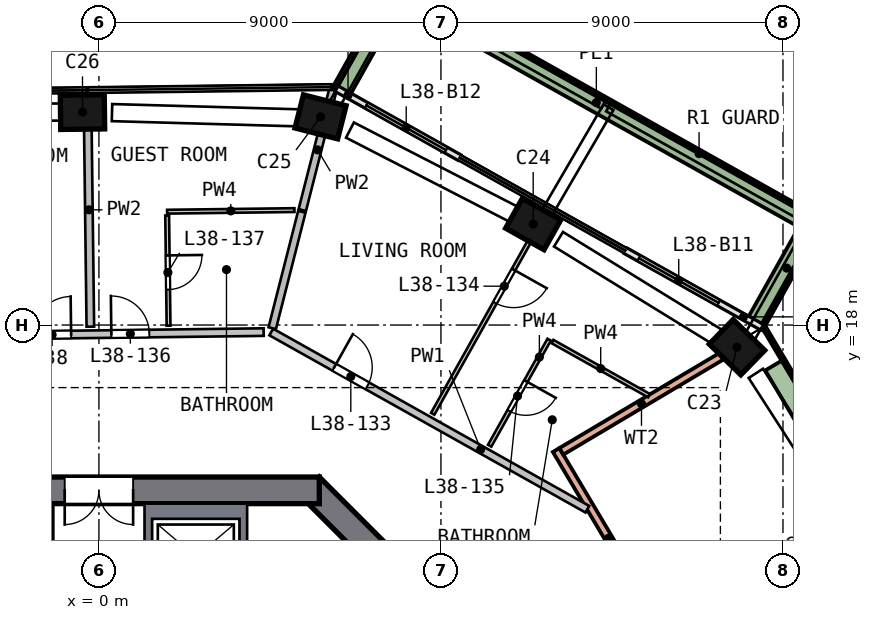
"""IFC4 building model, lengths in metres.
Left out: names, types, materials, properties, quantities, classifications, styles, units other than length and angle.
Written with IfcOpenShell. Run it as: python <this file> out.ifc"""

import sys

from ifc_helpers import new_model, si_unit, direction, frame, frame_2d, origin, origin_2d, place, context, subcontext, project, spatial, polyline, rectangle, outline, extrude, element, fill, save


model = new_model("IFC4")
c1 = context("Model", 3, precision=1e-05, world=origin(), true_north=direction((0.0, 1.0)))
c2 = subcontext(c1, "Body", "Model", "MODEL_VIEW")
j1 = project(units=[si_unit("LENGTHUNIT", "METRE"), si_unit("PLANEANGLEUNIT", "RADIAN")], contexts=[c1])
p1 = place(None, origin())
s1 = spatial("IfcSite", under=j1, at=p1, CompositionType="ELEMENT")
p2 = place(p1, origin())
s2 = spatial("IfcBuilding", under=s1, at=p2, CompositionType="ELEMENT")
p3 = place(p2, frame((0.0, 0.0, 158.5)))
s3 = spatial("IfcBuildingStorey", under=s2, at=p3, CompositionType="ELEMENT", Elevation=158.5)
p4 = place(p3, frame((16.89, 17.32, 0.0), z_axis=(-0.083020554, 0.079675403, 0.993357649), x_axis=(0.710835619, -0.693882614, 0.115063637)))
e1 = element("IfcColumn", 1, at=p4, inside=s3, PredefinedType="COLUMN", context=c2, shape_type="SweptSolid", body=[
    extrude(rectangle(XDim=1.15, YDim=0.9, at=origin_2d()), origin(), (0.0, 0.0, 1.0), 3.211),
])
p5 = place(p3, frame((11.546, 20.592, 0.0), z_axis=(-0.09840895, 0.054147738, 0.993671828), x_axis=(-0.866490221, 0.486394176, -0.112318307)))
e2 = element("IfcColumn", 2, at=p5, inside=s3, PredefinedType="COLUMN", context=c2, shape_type="SweptSolid", body=[
    extrude(rectangle(XDim=1.15, YDim=0.9, at=origin_2d()), origin(), (0.0, 0.0, 1.0), 3.21),
])
p6 = place(p3, frame((5.967, 23.445, 0.0), z_axis=(-0.111683446, 0.027369667, 0.993366855), x_axis=(0.962775758, -0.244625201, 0.114984131)))
e3 = element("IfcColumn", 3, at=p6, inside=s3, PredefinedType="COLUMN", context=c2, shape_type="SweptSolid", body=[
    extrude(rectangle(XDim=1.15, YDim=0.9, at=origin_2d()), origin(), (0.0, 0.0, 1.0), 3.211),
])
p7 = place(p3, frame((-0.297, 23.606, 0.0), z_axis=(-0.112250684, -0.002357569, 0.993677124), x_axis=(-0.993599767, -0.012434843, -0.112271448)))
e4 = element("IfcColumn", 4, at=p7, inside=s3, PredefinedType="COLUMN", context=c2, shape_type="SweptSolid", body=[
    extrude(rectangle(XDim=1.15, YDim=0.9, at=origin_2d()), origin(), (0.0, 0.0, 1.0), 3.21),
])
p8 = place(p3, frame((13.752, 5.552, 0.0), z_axis=(0.0, 0.0, 1.0), x_axis=(-0.707106781, 0.707106781, 0.0)))
e5 = element("IfcWall", 5, at=p8, inside=s3, PredefinedType="SHEAR", context=c2, shape_type="SweptSolid", body=[
    extrude(rectangle(XDim=11.598, YDim=0.7, at=frame_2d((5.799, 0.0))), origin(), (0.0, 0.0, 1.0), 3.5),
])
p9 = place(p8, frame((2.099, 0.0, 0.0)))
e6 = element("IfcOpeningElement", 6, at=p9, cuts=e5, PredefinedType="OPENING", context=c2, shape_type="SweptSolid", body=[
    extrude(rectangle(XDim=1.2, YDim=2.1, at=frame_2d((0.6, 1.05))), frame((0.0, 0.36, 0.0), z_axis=(0.0, -1.0, 0.0), x_axis=(1.0, 0.0, 0.0)), (0.0, 0.0, 1.0), 0.72),
])
p10 = place(p3, frame((5.799, 13.65, 0.0), z_axis=(0.0, 0.0, 1.0), x_axis=(-1.0, 0.0, 0.0)))
e7 = element("IfcWall", 7, at=p10, inside=s3, PredefinedType="SHEAR", context=c2, shape_type="SweptSolid", body=[
    extrude(rectangle(XDim=11.598, YDim=0.7, at=frame_2d((5.799, 0.0))), origin(), (0.0, 0.0, 1.0), 3.5),
])
p11 = place(p10, frame((4.899, 0.0, 0.0)))
e8 = element("IfcOpeningElement", 8, at=p11, cuts=e7, PredefinedType="OPENING", context=c2, shape_type="SweptSolid", body=[
    extrude(rectangle(XDim=1.8, YDim=2.1, at=frame_2d((0.9, 1.05))), frame((0.0, 0.36, 0.0), z_axis=(0.0, -1.0, 0.0), x_axis=(1.0, 0.0, 0.0)), (0.0, 0.0, 1.0), 0.72),
])
p12 = place(p3, frame((17.445, 17.944, 0.0), z_axis=(0.0, 0.0, 1.0), x_axis=(-0.872255586, 0.489050297, 0.0)))
e9 = element("IfcWall", 9, at=p12, inside=s3, PredefinedType="SOLIDWALL", context=c2, shape_type="SweptSolid", body=[
    extrude(rectangle(XDim=4.108, YDim=0.15, at=frame_2d((2.054, 0.0))), origin(), (0.0, 0.0, 1.0), 2.475),
])
p13 = place(p12, frame((1.308, 0.0, 0.0)))
e10 = element("IfcOpeningElement", 10, at=p13, cuts=e9, PredefinedType="OPENING", context=c2, shape_type="SweptSolid", body=[
    extrude(rectangle(XDim=2.4, YDim=2.4, at=frame_2d((1.2, 1.2))), frame((0.0, 0.085, 0.0), z_axis=(0.0, -1.0, 0.0), x_axis=(1.0, 0.0, 0.0)), (0.0, 0.0, 1.0), 0.17),
])
p14 = place(p3, frame((9.481, 22.409, 0.0), z_axis=(0.0, 0.0, 1.0), x_axis=(-0.872247803, 0.489064178, 0.0)))
e11 = element("IfcWall", 11, at=p14, inside=s3, PredefinedType="SOLIDWALL", context=c2, shape_type="SweptSolid", body=[
    extrude(rectangle(XDim=3.71, YDim=0.15, at=frame_2d((1.855, 0.0))), origin(), (0.0, 0.0, 1.0), 2.475),
])
p15 = place(p14, frame((0.4, 0.0, 0.0)))
e12 = element("IfcOpeningElement", 12, at=p15, cuts=e11, PredefinedType="OPENING", context=c2, shape_type="SweptSolid", body=[
    extrude(rectangle(XDim=2.4, YDim=2.4, at=frame_2d((1.2, 1.2))), frame((0.0, 0.085, 0.0), z_axis=(0.0, -1.0, 0.0), x_axis=(1.0, 0.0, 0.0)), (0.0, 0.0, 1.0), 0.17),
])
p16 = place(p3, frame((17.316, 18.103, 0.0), z_axis=(0.0, 0.0, 1.0), x_axis=(0.489112217, 0.872220866, 0.0)))
e13 = element("IfcWall", 13, at=p16, inside=s3, PredefinedType="SOLIDWALL", context=c2, shape_type="SweptSolid", body=[
    extrude(rectangle(XDim=3.199, YDim=0.5, at=frame_2d((1.6, 0.0))), origin(), (0.0, 0.0, 1.0), 0.7),
])
p17 = place(p3, frame((18.541, 20.798, 0.0), z_axis=(0.0, 0.0, 1.0), x_axis=(-0.872239778, 0.48907849, 0.0)))
e14 = element("IfcWall", 14, at=p17, inside=s3, PredefinedType="SOLIDWALL", context=c2, shape_type="SweptSolid", body=[
    extrude(rectangle(XDim=12.5, YDim=0.5, at=frame_2d((6.25, 0.0))), origin(), (0.0, 0.0, 1.0), 0.7),
])
p18 = place(p3, frame((7.733, 26.571, 0.0), z_axis=(0.0, 0.0, 1.0), x_axis=(-0.489118389, -0.872217405, 0.0)))
e15 = element("IfcWall", 15, at=p18, inside=s3, PredefinedType="SOLIDWALL", context=c2, shape_type="SweptSolid", body=[
    extrude(rectangle(XDim=2.699, YDim=0.5, at=frame_2d((1.35, 0.0))), origin(), (0.0, 0.0, 1.0), 0.7),
])
p19 = place(p3, frame((12.032, 14.711, 0.0), z_axis=(0.0, 0.0, 1.0), x_axis=(0.510837252, -0.859677441, 0.0)))
e16 = element("IfcWall", 16, at=p19, inside=s3, PredefinedType="SOLIDWALL", context=c2, shape_type="SweptSolid", body=[
    extrude(rectangle(XDim=13.0, YDim=0.2, at=frame_2d((6.5, 0.0))), origin(), (0.0, 0.0, 1.0), 3.19),
])
p20 = place(p19, frame((5.6, 0.0, 0.0)))
e17 = element("IfcOpeningElement", 17, at=p20, cuts=e16, PredefinedType="OPENING", context=c2, shape_type="SweptSolid", body=[
    extrude(rectangle(XDim=1.8, YDim=2.4, at=frame_2d((0.9, 1.2))), frame((0.0, 0.11, 0.0), z_axis=(0.0, -1.0, 0.0), x_axis=(1.0, 0.0, 0.0)), (0.0, 0.0, 1.0), 0.22),
])
p21 = place(p3, frame((16.385, 17.181, 0.0), z_axis=(0.0, 0.0, 1.0), x_axis=(-0.859664129, -0.510859653, 0.0)))
e18 = element("IfcWall", 18, at=p21, inside=s3, PredefinedType="SOLIDWALL", context=c2, shape_type="SweptSolid", body=[
    extrude(rectangle(XDim=4.904, YDim=0.2, at=frame_2d((2.452, 0.0))), origin(), (0.0, 0.0, 1.0), 3.19),
])
p22 = place(p3, frame((24.091, 6.848, 0.0), z_axis=(0.0, 0.0, 1.0), x_axis=(-0.510839218, 0.859676272, 0.0)))
e19 = element("IfcWall", 19, at=p22, inside=s3, PredefinedType="SOLIDWALL", context=c2, shape_type="SweptSolid", body=[
    extrude(rectangle(XDim=12.84, YDim=0.1, at=frame_2d((6.42, 0.0))), origin(), (0.0, 0.0, 1.0), 0.7),
])
p23 = place(p3, frame((20.024, 13.104, 0.0), z_axis=(0.0, 0.0, 1.0), x_axis=(-0.510847726, 0.859671217, 0.0)))
e20 = element("IfcWall", 20, at=p23, inside=s3, PredefinedType="SOLIDWALL", context=c2, shape_type="SweptSolid", body=[
    extrude(rectangle(XDim=4.454, YDim=0.5, at=frame_2d((2.227, 0.0))), origin(), (0.0, 0.0, 1.0), 0.7),
])
p24 = place(p3, origin())
e21 = element("IfcWall", 21, at=p24, inside=s3, PredefinedType="SOLIDWALL", context=c2, shape_type="SweptSolid", body=[
    extrude(outline(polyline([(3.9, 13.3), (3.9, 10.9), (3.7, 10.9), (3.7, 12.9), (1.4, 12.9), (1.4, 10.9), (1.2, 10.9), (1.2, 13.3), (3.9, 13.3)])), origin(), (0.0, 0.0, 1.0), 3.19),
])
p25 = place(p3, origin())
e22 = element("IfcWall", 22, at=p25, inside=s3, PredefinedType="SOLIDWALL", context=c2, shape_type="SweptSolid", body=[
    extrude(outline(polyline([(-3.9, 10.9), (-3.9, 13.3), (-1.2, 13.3), (-1.2, 10.9), (-1.4, 10.9), (-1.4, 12.9), (-3.7, 12.9), (-3.7, 10.9), (-3.9, 10.9)])), origin(), (0.0, 0.0, 1.0), 3.19),
])
p26 = place(p3, frame((-4.981, 17.697, 0.0), z_axis=(0.0, 0.0, 1.0), x_axis=(0.99992089, 0.012578281, 0.0)))
e23 = element("IfcWall", 23, at=p26, inside=s3, PredefinedType="SOLIDWALL", context=c2, shape_type="SweptSolid", body=[
    extrude(rectangle(XDim=9.317, YDim=0.2, at=frame_2d((4.658, 0.0))), origin(), (0.0, 0.0, 1.0), 3.19),
])
p27 = place(p26, frame((5.308, 0.0, 0.0)))
e24 = element("IfcOpeningElement", 24, at=p27, cuts=e23, PredefinedType="OPENING", context=c2, shape_type="SweptSolid", body=[
    extrude(rectangle(XDim=1.0, YDim=2.1, at=frame_2d((0.5, 1.05))), frame((0.0, 0.11, 0.0), z_axis=(0.0, -1.0, 0.0), x_axis=(1.0, 0.0, 0.0)), (0.0, 0.0, 1.0), 0.22),
])
p28 = place(p26, frame((3.25, 0.0, 0.0)))
e25 = element("IfcOpeningElement", 25, at=p28, cuts=e23, PredefinedType="OPENING", context=c2, shape_type="SweptSolid", body=[
    extrude(rectangle(XDim=1.0, YDim=2.1, at=frame_2d((0.5, 1.05))), frame((0.0, 0.11, 0.0), z_axis=(0.0, -1.0, 0.0), x_axis=(1.0, 0.0, 0.0)), (0.0, 0.0, 1.0), 0.22),
])
p29 = place(p3, frame((4.535, 17.817, 0.0), z_axis=(0.0, 0.0, 1.0), x_axis=(0.872241337, -0.48907571, 0.0)))
e26 = element("IfcWall", 26, at=p29, inside=s3, PredefinedType="SOLIDWALL", context=c2, shape_type="SweptSolid", body=[
    extrude(rectangle(XDim=9.536, YDim=0.2, at=frame_2d((4.768, 0.0))), origin(), (0.0, 0.0, 1.0), 3.19),
])
p30 = place(p29, frame((1.9, 0.0, 0.0)))
e27 = element("IfcOpeningElement", 27, at=p30, cuts=e26, PredefinedType="OPENING", context=c2, shape_type="SweptSolid", body=[
    extrude(rectangle(XDim=1.0, YDim=2.1, at=frame_2d((0.5, 1.05))), frame((0.0, 0.11, 0.0), z_axis=(0.0, -1.0, 0.0), x_axis=(1.0, 0.0, 0.0)), (0.0, 0.0, 1.0), 0.22),
])
p31 = place(p3, frame((-0.226, 17.957, 0.0), z_axis=(0.0, 0.0, 1.0), x_axis=(-0.012583862, 0.99992082, 0.0)))
e28 = element("IfcWall", 28, at=p31, inside=s3, PredefinedType="SOLIDWALL", context=c2, shape_type="SweptSolid", body=[
    extrude(rectangle(XDim=6.15, YDim=0.2, at=frame_2d((3.075, 0.0))), origin(), (0.0, 0.0, 1.0), 3.19),
])
p32 = place(p3, frame((4.56, 17.917, 0.0), z_axis=(0.0, 0.0, 1.0), x_axis=(0.246658182, 0.969102544, 0.0)))
e29 = element("IfcWall", 29, at=p32, inside=s3, PredefinedType="SOLIDWALL", context=c2, shape_type="SweptSolid", body=[
    extrude(rectangle(XDim=3.161, YDim=0.2, at=frame_2d((1.581, 0.0))), origin(), (0.0, 0.0, 1.0), 3.19),
])
p33 = place(p3, frame((5.352, 21.025, 0.0), z_axis=(0.0, 0.0, 1.0), x_axis=(0.246646118, 0.969105615, 0.0)))
e30 = element("IfcWall", 30, at=p33, inside=s3, PredefinedType="SOLIDWALL", context=c2, shape_type="SweptSolid", body=[
    extrude(rectangle(XDim=3.269, YDim=0.2, at=frame_2d((1.634, 0.0))), origin(), (0.0, 0.0, 1.0), 3.19),
])
p34 = place(p3, frame((1.796, 20.883, 0.0), z_axis=(0.0, 0.0, 1.0), x_axis=(0.012544268, -0.999921318, 0.0)))
e31 = element("IfcWall", 31, at=p34, inside=s3, PredefinedType="PARTITIONING", context=c2, shape_type="SweptSolid", body=[
    extrude(rectangle(XDim=2.9, YDim=0.1, at=frame_2d((1.45, 0.0))), origin(), (0.0, 0.0, 1.0), 3.19),
])
p35 = place(p34, frame((1.05, 0.0, 0.0)))
e32 = element("IfcOpeningElement", 32, at=p35, cuts=e31, PredefinedType="OPENING", context=c2, shape_type="SweptSolid", body=[
    extrude(rectangle(XDim=0.9, YDim=2.1, at=frame_2d((0.45, 1.05))), frame((0.0, 0.06, 0.0), z_axis=(0.0, -1.0, 0.0), x_axis=(1.0, 0.0, 0.0)), (0.0, 0.0, 1.0), 0.12),
])
p36 = place(p3, frame((1.795, 20.982, 0.0), z_axis=(0.0, 0.0, 1.0), x_axis=(0.999920535, 0.01260649, 0.0)))
e33 = element("IfcWall", 33, at=p36, inside=s3, PredefinedType="PARTITIONING", context=c2, shape_type="SweptSolid", body=[
    extrude(rectangle(XDim=3.35, YDim=0.1, at=frame_2d((1.675, 0.0))), origin(), (0.0, 0.0, 1.0), 3.19),
])
p37 = place(p3, frame((11.791, 21.028, 0.0), z_axis=(0.0, 0.0, 1.0), x_axis=(-0.489107358, -0.872223591, 0.0)))
e34 = element("IfcWall", 34, at=p37, inside=s3, PredefinedType="PARTITIONING", context=c2, shape_type="SweptSolid", body=[
    extrude(rectangle(XDim=6.15, YDim=0.1, at=frame_2d((3.075, 0.0))), origin(), (0.0, 0.0, 1.0), 3.19),
])
p38 = place(p37, frame((1.8, 0.0, 0.0)))
e35 = element("IfcOpeningElement", 35, at=p38, cuts=e34, PredefinedType="OPENING", context=c2, shape_type="SweptSolid", body=[
    extrude(rectangle(XDim=1.0, YDim=2.1, at=frame_2d((0.5, 1.05))), frame((0.0, 0.06, 0.0), z_axis=(0.0, -1.0, 0.0), x_axis=(1.0, 0.0, 0.0)), (0.0, 0.0, 1.0), 0.12),
])
p39 = place(p3, frame((11.847, 17.615, 0.0), z_axis=(0.0, 0.0, 1.0), x_axis=(-0.48909811, -0.872228777, 0.0)))
e36 = element("IfcWall", 36, at=p39, inside=s3, PredefinedType="PARTITIONING", context=c2, shape_type="SweptSolid", body=[
    extrude(rectangle(XDim=3.2, YDim=0.1, at=frame_2d((1.6, 0.0))), origin(), (0.0, 0.0, 1.0), 3.19),
])
p40 = place(p39, frame((1.25, 0.0, 0.0)))
e37 = element("IfcOpeningElement", 37, at=p40, cuts=e36, PredefinedType="OPENING", context=c2, shape_type="SweptSolid", body=[
    extrude(rectangle(XDim=0.9, YDim=2.1, at=frame_2d((0.45, 1.05))), frame((0.0, 0.06, 0.0), z_axis=(0.0, -1.0, 0.0), x_axis=(1.0, 0.0, 0.0)), (0.0, 0.0, 1.0), 0.12),
])
p41 = place(p3, frame((14.474, 16.142, 0.0), z_axis=(0.0, 0.0, 1.0), x_axis=(-0.872228533, 0.489098545, 0.0)))
e38 = element("IfcWall", 38, at=p41, inside=s3, PredefinedType="PARTITIONING", context=c2, shape_type="SweptSolid", body=[
    extrude(rectangle(XDim=2.912, YDim=0.1, at=frame_2d((1.456, 0.0))), origin(), (0.0, 0.0, 1.0), 3.19),
])
p42 = place(p13, origin())
e39 = element("IfcDoor", 39, at=p42, inside=s3, OperationType="SLIDING_TO_LEFT", PredefinedType="DOOR", context=c2, shape_type="SweptSolid", body=[
    extrude(rectangle(XDim=2.4, YDim=2.4, at=frame_2d((1.2, 1.2))), frame((0.0, 0.025, 0.0), z_axis=(0.0, -1.0, 0.0), x_axis=(1.0, 0.0, 0.0)), (0.0, 0.0, 1.0), 0.05),
])
fill(e10, e39)
p43 = place(p15, origin())
e40 = element("IfcDoor", 40, at=p43, inside=s3, OperationType="SLIDING_TO_RIGHT", PredefinedType="DOOR", context=c2, shape_type="SweptSolid", body=[
    extrude(rectangle(XDim=2.4, YDim=2.4, at=frame_2d((1.2, 1.2))), frame((0.0, 0.025, 0.0), z_axis=(0.0, -1.0, 0.0), x_axis=(1.0, 0.0, 0.0)), (0.0, 0.0, 1.0), 0.05),
])
fill(e12, e40)
p44 = place(p11, origin())
e41 = element("IfcDoor", 41, at=p44, inside=s3, OperationType="DOUBLE_DOOR_SINGLE_SWING", PredefinedType="DOOR", context=c2, shape_type="SweptSolid", body=[
    extrude(rectangle(XDim=1.8, YDim=2.1, at=frame_2d((0.9, 1.05))), frame((0.0, 0.025, 0.0), z_axis=(0.0, -1.0, 0.0), x_axis=(1.0, 0.0, 0.0)), (0.0, 0.0, 1.0), 0.05),
])
fill(e8, e41)
p45 = place(p30, origin())
e42 = element("IfcDoor", 42, at=p45, inside=s3, OperationType="SINGLE_SWING_LEFT", PredefinedType="DOOR", context=c2, shape_type="SweptSolid", body=[
    extrude(rectangle(XDim=1.0, YDim=2.1, at=frame_2d((0.5, 1.05))), frame((0.0, 0.025, 0.0), z_axis=(0.0, -1.0, 0.0), x_axis=(1.0, 0.0, 0.0)), (0.0, 0.0, 1.0), 0.05),
])
fill(e27, e42)
p46 = place(p38, origin())
e43 = element("IfcDoor", 43, at=p46, inside=s3, OperationType="SINGLE_SWING_LEFT", PredefinedType="DOOR", context=c2, shape_type="SweptSolid", body=[
    extrude(rectangle(XDim=1.0, YDim=2.1, at=frame_2d((0.5, 1.05))), frame((0.0, 0.025, 0.0), z_axis=(0.0, -1.0, 0.0), x_axis=(1.0, 0.0, 0.0)), (0.0, 0.0, 1.0), 0.05),
])
fill(e35, e43)
p47 = place(p40, origin())
e44 = element("IfcDoor", 44, at=p47, inside=s3, OperationType="SINGLE_SWING_LEFT", PredefinedType="DOOR", context=c2, shape_type="SweptSolid", body=[
    extrude(rectangle(XDim=0.9, YDim=2.1, at=frame_2d((0.45, 1.05))), frame((0.0, 0.025, 0.0), z_axis=(0.0, -1.0, 0.0), x_axis=(1.0, 0.0, 0.0)), (0.0, 0.0, 1.0), 0.05),
])
fill(e37, e44)
p48 = place(p27, origin())
e45 = element("IfcDoor", 45, at=p48, inside=s3, OperationType="SINGLE_SWING_LEFT", PredefinedType="DOOR", context=c2, shape_type="SweptSolid", body=[
    extrude(rectangle(XDim=1.0, YDim=2.1, at=frame_2d((0.5, 1.05))), frame((0.0, 0.025, 0.0), z_axis=(0.0, -1.0, 0.0), x_axis=(1.0, 0.0, 0.0)), (0.0, 0.0, 1.0), 0.05),
])
fill(e24, e45)
p49 = place(p35, origin())
e46 = element("IfcDoor", 46, at=p49, inside=s3, OperationType="SINGLE_SWING_LEFT", PredefinedType="DOOR", context=c2, shape_type="SweptSolid", body=[
    extrude(rectangle(XDim=0.9, YDim=2.1, at=frame_2d((0.45, 1.05))), frame((0.0, 0.025, 0.0), z_axis=(0.0, -1.0, 0.0), x_axis=(1.0, 0.0, 0.0)), (0.0, 0.0, 1.0), 0.05),
])
fill(e32, e46)
p50 = place(p28, origin())
e47 = element("IfcDoor", 47, at=p50, inside=s3, OperationType="SINGLE_SWING_RIGHT", PredefinedType="DOOR", context=c2, shape_type="SweptSolid", body=[
    extrude(rectangle(XDim=1.0, YDim=2.1, at=frame_2d((0.5, 1.05))), frame((0.0, 0.025, 0.0), z_axis=(0.0, -1.0, 0.0), x_axis=(1.0, 0.0, 0.0)), (0.0, 0.0, 1.0), 0.05),
])
fill(e25, e47)
save(model, sys.argv[1])
